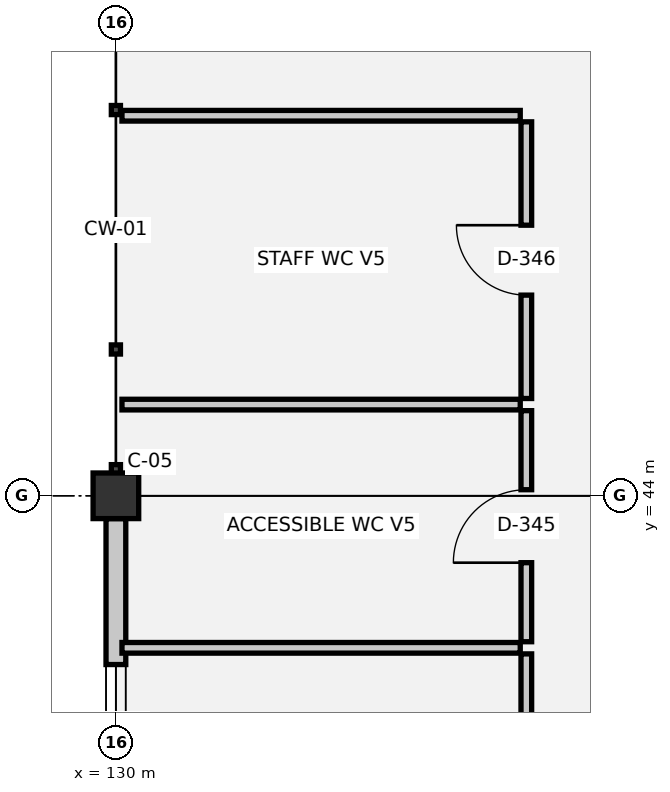
"""IFC4 building model, lengths in metres.
Left out: names, types, materials, properties, quantities, classifications, styles, units other than length and angle.
Written with IfcOpenShell. Run it as: python <this file> out.ifc"""

import sys

from ifc_helpers import new_model, si_unit, direction, frame, frame_2d, origin, origin_2d, place, context, subcontext, project, spatial, rectangle, extrude, element, fill, save


model = new_model("IFC4")
c1 = context("Model", 3, precision=1e-05, world=origin(), true_north=direction((0.0, 1.0)))
c2 = subcontext(c1, "Body", "Model", "MODEL_VIEW")
j1 = project(units=[si_unit("LENGTHUNIT", "METRE"), si_unit("PLANEANGLEUNIT", "RADIAN")], contexts=[c1])
p1 = place(None, origin())
s1 = spatial("IfcSite", under=j1, at=p1, CompositionType="ELEMENT")
p2 = place(p1, origin())
s2 = spatial("IfcBuilding", under=s1, at=p2, CompositionType="ELEMENT")
p3 = place(p2, frame((0.0, 0.0, 22.05)))
s3 = spatial("IfcBuildingStorey", under=s2, at=p3, CompositionType="ELEMENT", Elevation=22.05)
p4 = place(p3, frame((130.0, 44.0, 0.0), z_axis=(0.0, 0.0, 1.0), x_axis=(1.0, 0.0, 0.0)))
e1 = element("IfcColumn", 1, at=p4, inside=s3, PredefinedType="COLUMN", context=c2, shape_type="SweptSolid", body=[
    extrude(rectangle(XDim=0.6, YDim=0.6, at=origin_2d()), origin(), (0.0, 0.0, 1.0), 3.75),
])
p5 = place(p3, frame((130.0, 38.3, 0.0), z_axis=(0.0, 0.0, 1.0), x_axis=(0.0, 1.0, 0.0)))
e2 = element("IfcWall", 2, at=p5, inside=s3, PredefinedType="SOLIDWALL", context=c2, shape_type="SweptSolid", body=[
    extrude(rectangle(XDim=5.4, YDim=0.26, at=frame_2d((2.7, 0.0))), origin(), (0.0, 0.0, 1.0), 2.51),
])
p6 = place(p5, frame((0.88, 0.0, 1.0)))
e3 = element("IfcOpeningElement", 3, at=p6, cuts=e2, PredefinedType="OPENING", context=c2, shape_type="SweptSolid", body=[
    extrude(rectangle(XDim=2.6, YDim=1.1, at=frame_2d((1.3, 0.55))), frame((0.0, 0.14, 0.0), z_axis=(0.0, -1.0, 0.0), x_axis=(1.0, 0.0, 0.0)), (0.0, 0.0, 1.0), 0.28),
])
for number, where, z_axis, x_axis in (
    (4, (130.08, 42.0, 0.0), (0.0, 0.0, 1.0), (1.0, 0.0, 0.0)),
    (5, (130.08, 45.2, 0.0), (0.0, 0.0, 1.0), (1.0, 0.0, 0.0)),
    (6, (130.08, 49.0, 0.0), (0.0, 0.0, 1.0), (1.0, 0.0, 0.0)),
):
    element("IfcWall", number, at=place(p3, frame(where, z_axis=z_axis, x_axis=x_axis)), inside=s3, PredefinedType="PLUMBINGWALL", context=c2, shape_type="SweptSolid", body=[
        extrude(rectangle(XDim=5.24, YDim=0.14, at=frame_2d((2.62, 0.0))), origin(), (0.0, 0.0, 1.0), 3.39),
    ])
p7 = place(p3, frame((135.4, 38.08, 0.0), z_axis=(0.0, 0.0, 1.0), x_axis=(0.0, 1.0, 0.0)))
e7 = element("IfcWall", 7, at=p7, inside=s3, PredefinedType="PLUMBINGWALL", context=c2, shape_type="SweptSolid", body=[
    extrude(rectangle(XDim=3.84, YDim=0.14, at=frame_2d((1.92, 0.0))), origin(), (0.0, 0.0, 1.0), 3.39),
])
p8 = place(p7, frame((1.46, 0.0, 0.0)))
e8 = element("IfcOpeningElement", 8, at=p8, cuts=e7, PredefinedType="OPENING", context=c2, shape_type="SweptSolid", body=[
    extrude(rectangle(XDim=0.92, YDim=2.1, at=frame_2d((0.46, 1.05))), frame((0.0, 0.08, 0.0), z_axis=(0.0, -1.0, 0.0), x_axis=(1.0, 0.0, 0.0)), (0.0, 0.0, 1.0), 0.16),
])
p9 = place(p3, frame((135.4, 42.08, 0.0), z_axis=(0.0, 0.0, 1.0), x_axis=(0.0, 1.0, 0.0)))
e9 = element("IfcWall", 9, at=p9, inside=s3, PredefinedType="PLUMBINGWALL", context=c2, shape_type="SweptSolid", body=[
    extrude(rectangle(XDim=3.04, YDim=0.14, at=frame_2d((1.52, 0.0))), origin(), (0.0, 0.0, 1.0), 3.39),
])
p10 = place(p9, frame((1.04, 0.0, 0.0)))
e10 = element("IfcOpeningElement", 10, at=p10, cuts=e9, PredefinedType="OPENING", context=c2, shape_type="SweptSolid", body=[
    extrude(rectangle(XDim=0.96, YDim=2.1, at=frame_2d((0.48, 1.05))), frame((0.0, 0.08, 0.0), z_axis=(0.0, -1.0, 0.0), x_axis=(1.0, 0.0, 0.0)), (0.0, 0.0, 1.0), 0.16),
])
p11 = place(p3, frame((135.4, 45.28, 0.0), z_axis=(0.0, 0.0, 1.0), x_axis=(0.0, 1.0, 0.0)))
e11 = element("IfcWall", 11, at=p11, inside=s3, PredefinedType="PLUMBINGWALL", context=c2, shape_type="SweptSolid", body=[
    extrude(rectangle(XDim=3.64, YDim=0.14, at=frame_2d((1.82, 0.0))), origin(), (0.0, 0.0, 1.0), 3.39),
])
p12 = place(p11, frame((1.36, 0.0, 0.0)))
e12 = element("IfcOpeningElement", 12, at=p12, cuts=e11, PredefinedType="OPENING", context=c2, shape_type="SweptSolid", body=[
    extrude(rectangle(XDim=0.92, YDim=2.1, at=frame_2d((0.46, 1.05))), frame((0.0, 0.08, 0.0), z_axis=(0.0, -1.0, 0.0), x_axis=(1.0, 0.0, 0.0)), (0.0, 0.0, 1.0), 0.16),
])
p13 = place(p6, origin())
e13 = element("IfcWindow", 13, at=p13, inside=s3, PartitioningType="SINGLE_PANEL", PredefinedType="WINDOW", context=c2, shape_type="SweptSolid", body=[
    extrude(rectangle(XDim=2.6, YDim=1.1, at=frame_2d((1.3, 0.55))), frame((0.0, 0.03, 0.0), z_axis=(0.0, -1.0, 0.0), x_axis=(1.0, 0.0, 0.0)), (0.0, 0.0, 1.0), 0.06),
])
fill(e3, e13)
p14 = place(p10, origin())
e14 = element("IfcDoor", 14, at=p14, inside=s3, OperationType="SINGLE_SWING_LEFT", PredefinedType="DOOR", context=c2, shape_type="SweptSolid", body=[
    extrude(rectangle(XDim=0.96, YDim=2.1, at=frame_2d((0.48, 1.05))), frame((0.0, 0.025, 0.0), z_axis=(0.0, -1.0, 0.0), x_axis=(1.0, 0.0, 0.0)), (0.0, 0.0, 1.0), 0.05),
])
fill(e10, e14)
p15 = place(p12, origin())
e15 = element("IfcDoor", 15, at=p15, inside=s3, OperationType="SINGLE_SWING_RIGHT", PredefinedType="DOOR", context=c2, shape_type="SweptSolid", body=[
    extrude(rectangle(XDim=0.92, YDim=2.1, at=frame_2d((0.46, 1.05))), frame((0.0, 0.025, 0.0), z_axis=(0.0, -1.0, 0.0), x_axis=(1.0, 0.0, 0.0)), (0.0, 0.0, 1.0), 0.05),
])
fill(e12, e15)
save(model, sys.argv[1])
